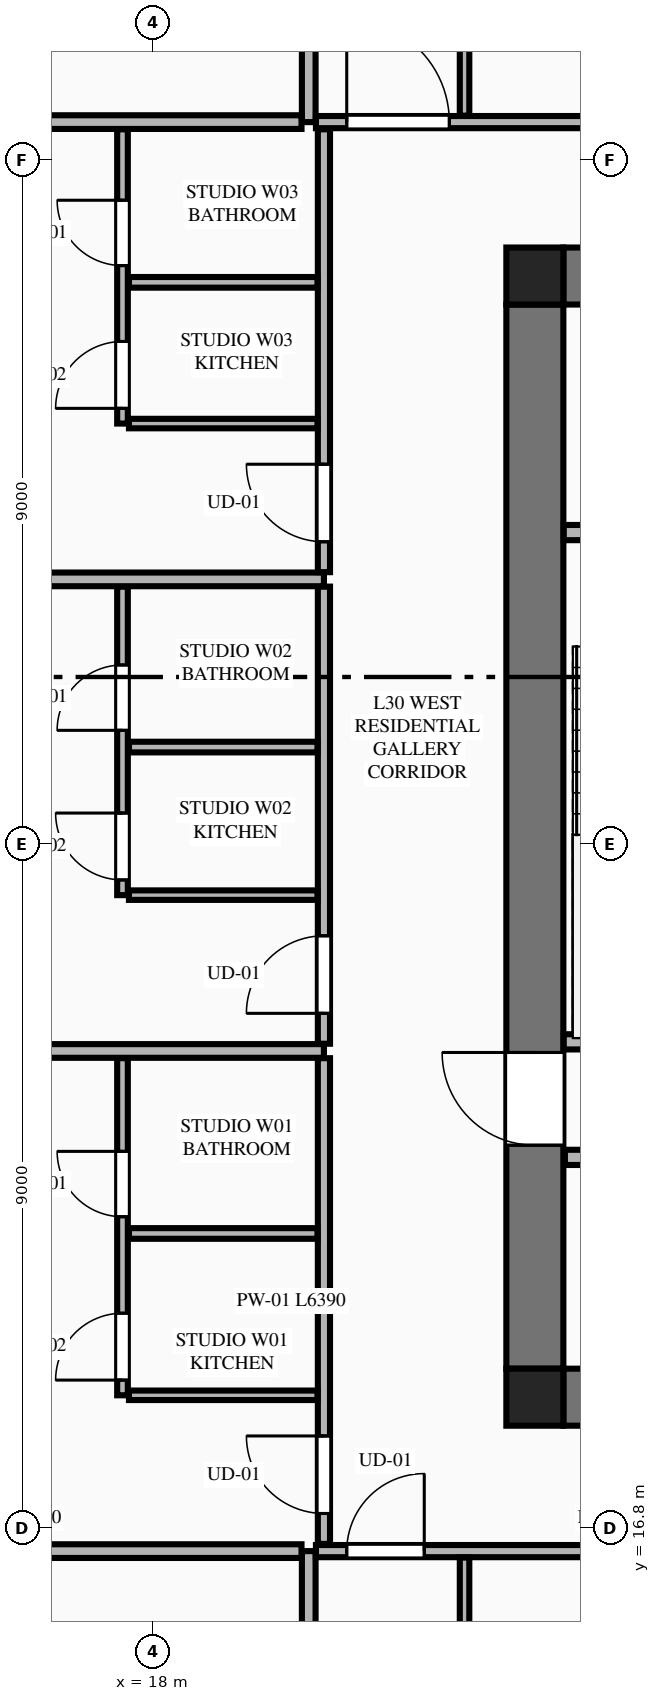
"""IFC4 building model, lengths in metres.
Left out: names, types, materials, properties, quantities, classifications, styles, units other than length and angle.
Written with IfcOpenShell. Run it as: python <this file> out.ifc"""

import sys

from ifc_helpers import new_model, si_unit, direction, frame, frame_2d, origin, origin_2d, place, context, subcontext, project, spatial, rectangle, extrude, element, fill, save


model = new_model("IFC4")
c1 = context("Model", 3, precision=1e-05, world=origin(), true_north=direction((0.0, 1.0)))
c2 = subcontext(c1, "Body", "Model", "MODEL_VIEW")
j1 = project(units=[si_unit("LENGTHUNIT", "METRE"), si_unit("PLANEANGLEUNIT", "RADIAN")], contexts=[c1])
p1 = place(None, origin())
s1 = spatial("IfcSite", under=j1, at=p1, CompositionType="ELEMENT")
p2 = place(p1, origin())
s2 = spatial("IfcBuilding", under=s1, at=p2, CompositionType="ELEMENT")
p3 = place(p2, frame((0.0, 0.0, 116.15)))
s3 = spatial("IfcBuildingStorey", under=s2, at=p3, CompositionType="ELEMENT", Elevation=116.15)
for number, where, z_axis, x_axis in (
    (1, (23.025, 18.525, 0.0), (0.0, 0.0, 1.0), (1.0, 0.0, 0.0)),
    (2, (23.025, 33.275, 0.0), (0.0, 0.0, 1.0), (1.0, 0.0, 0.0)),
):
    element("IfcColumn", number, at=place(p3, frame(where, z_axis=z_axis, x_axis=x_axis)), inside=s3, PredefinedType="COLUMN", context=c2, shape_type="SweptSolid", body=[
        extrude(rectangle(XDim=0.75, YDim=0.75, at=origin_2d()), origin(), (0.0, 0.0, 1.0), 3.55),
    ])
for number, where, z_axis, x_axis in (
    (3, (23.4, 18.525, 0.0), (0.0, 0.0, 1.0), (1.0, 0.0, 0.0)),
    (4, (23.4, 33.275, 0.0), (0.0, 0.0, 1.0), (1.0, 0.0, 0.0)),
):
    element("IfcWall", number, at=place(p3, frame(where, z_axis=z_axis, x_axis=x_axis)), inside=s3, PredefinedType="SHEAR", context=c2, shape_type="SweptSolid", body=[
        extrude(rectangle(XDim=18.0, YDim=0.75, at=frame_2d((9.0, 0.0))), origin(), (0.0, 0.0, 1.0), 3.34),
    ])
p4 = place(p3, frame((23.025, 18.9, 0.0), z_axis=(0.0, 0.0, 1.0), x_axis=(0.0, 1.0, 0.0)))
e5 = element("IfcWall", 5, at=p4, inside=s3, PredefinedType="SHEAR", context=c2, shape_type="SweptSolid", body=[
    extrude(rectangle(XDim=14.0, YDim=0.75, at=frame_2d((7.0, 0.0))), origin(), (0.0, 0.0, 1.0), 3.34),
])
p5 = place(p4, frame((2.94, 0.0, 0.0)))
e6 = element("IfcOpeningElement", 6, at=p5, cuts=e5, PredefinedType="OPENING", context=c2, shape_type="SweptSolid", body=[
    extrude(rectangle(XDim=1.22, YDim=2.25, at=frame_2d((0.61, 1.125))), frame((0.0, 0.385, 0.0), z_axis=(0.0, -1.0, 0.0), x_axis=(1.0, 0.0, 0.0)), (0.0, 0.0, 1.0), 0.77),
])
p6 = place(p3, frame((23.405, 23.2, 0.0), z_axis=(0.0, 0.0, 1.0), x_axis=(1.0, 0.0, 0.0)))
e7 = element("IfcWall", 7, at=p6, inside=s3, PredefinedType="PLUMBINGWALL", context=c2, shape_type="SweptSolid", body=[
    extrude(rectangle(XDim=3.27, YDim=0.2, at=frame_2d((1.635, 0.0))), origin(), (0.0, 0.0, 1.0), 3.34),
])
p7 = place(p3, frame((23.405, 29.9, 0.0), z_axis=(0.0, 0.0, 1.0), x_axis=(1.0, 0.0, 0.0)))
e8 = element("IfcWall", 8, at=p7, inside=s3, PredefinedType="PLUMBINGWALL", context=c2, shape_type="SweptSolid", body=[
    extrude(rectangle(XDim=3.27, YDim=0.2, at=frame_2d((1.635, 0.0))), origin(), (0.0, 0.0, 1.0), 3.34),
])
p8 = place(p7, frame((1.85, 0.0, 0.0)))
e9 = element("IfcOpeningElement", 9, at=p8, cuts=e8, PredefinedType="OPENING", context=c2, shape_type="SweptSolid", body=[
    extrude(rectangle(XDim=0.85, YDim=2.05, at=frame_2d((0.425, 1.025))), frame((0.0, 0.11, 0.0), z_axis=(0.0, -1.0, 0.0), x_axis=(1.0, 0.0, 0.0)), (0.0, 0.0, 1.0), 0.22),
])
p9 = place(p3, frame((23.42, 21.68, 0.0), z_axis=(0.0, 0.0, 1.0), x_axis=(1.0, 0.0, 0.0)))
e10 = element("IfcWall", 10, at=p9, inside=s3, PredefinedType="PLUMBINGWALL", context=c2, shape_type="SweptSolid", body=[
    extrude(rectangle(XDim=17.96, YDim=0.2, at=frame_2d((8.98, 0.0))), origin(), (0.0, 0.0, 1.0), 3.34),
])
p10 = place(p9, frame((11.6, 0.0, 0.0)))
e11 = element("IfcOpeningElement", 11, at=p10, cuts=e10, PredefinedType="OPENING", context=c2, shape_type="SweptSolid", body=[
    extrude(rectangle(XDim=1.1, YDim=2.2, at=frame_2d((0.55, 1.1))), frame((0.0, 0.11, 0.0), z_axis=(0.0, -1.0, 0.0), x_axis=(1.0, 0.0, 0.0)), (0.0, 0.0, 1.0), 0.22),
])
p11 = place(p9, frame((0.41, 0.0, 0.0)))
e12 = element("IfcOpeningElement", 12, at=p11, cuts=e10, PredefinedType="OPENING", context=c2, shape_type="SweptSolid", body=[
    extrude(rectangle(XDim=0.85, YDim=2.05, at=frame_2d((0.425, 1.025))), frame((0.0, 0.11, 0.0), z_axis=(0.0, -1.0, 0.0), x_axis=(1.0, 0.0, 0.0)), (0.0, 0.0, 1.0), 0.22),
])
p12 = place(p9, frame((6.03, 0.0, 0.0)))
e13 = element("IfcOpeningElement", 13, at=p12, cuts=e10, PredefinedType="OPENING", context=c2, shape_type="SweptSolid", body=[
    extrude(rectangle(XDim=0.85, YDim=2.05, at=frame_2d((0.425, 1.025))), frame((0.0, 0.11, 0.0), z_axis=(0.0, -1.0, 0.0), x_axis=(1.0, 0.0, 0.0)), (0.0, 0.0, 1.0), 0.22),
])
p13 = place(p9, frame((13.78, 0.0, 0.0)))
e14 = element("IfcOpeningElement", 14, at=p13, cuts=e10, PredefinedType="OPENING", context=c2, shape_type="SweptSolid", body=[
    extrude(rectangle(XDim=0.85, YDim=2.05, at=frame_2d((0.425, 1.025))), frame((0.0, 0.11, 0.0), z_axis=(0.0, -1.0, 0.0), x_axis=(1.0, 0.0, 0.0)), (0.0, 0.0, 1.0), 0.22),
])
p14 = place(p3, frame((20.05, 4.105, 0.0), z_axis=(0.0, 0.0, 1.0), x_axis=(0.0, 1.0, 0.0)))
e15 = element("IfcWall", 15, at=p14, inside=s3, PredefinedType="PARTITIONING", context=c2, shape_type="SweptSolid", body=[
    extrude(rectangle(XDim=12.395, YDim=0.18, at=frame_2d((6.198, 0.0))), origin(), (0.0, 0.0, 1.0), 3.34),
])
p15 = place(p3, frame((20.145, 16.5, 0.0), z_axis=(0.0, 0.0, 1.0), x_axis=(1.0, 0.0, 0.0)))
e16 = element("IfcWall", 16, at=p15, inside=s3, PredefinedType="PARTITIONING", context=c2, shape_type="SweptSolid", body=[
    extrude(rectangle(XDim=8.328, YDim=0.16, at=frame_2d((4.164, 0.0))), origin(), (0.0, 0.0, 1.0), 3.34),
])
p16 = place(p15, frame((0.405, 0.0, 0.0)))
e17 = element("IfcOpeningElement", 17, at=p16, cuts=e16, PredefinedType="OPENING", context=c2, shape_type="SweptSolid", body=[
    extrude(rectangle(XDim=1.02, YDim=2.25, at=frame_2d((0.51, 1.125))), frame((0.0, 0.09, 0.0), z_axis=(0.0, -1.0, 0.0), x_axis=(1.0, 0.0, 0.0)), (0.0, 0.0, 1.0), 0.18),
])
p17 = place(p3, frame((22.1, 12.391, 0.0), z_axis=(0.0, 0.0, 1.0), x_axis=(0.0, 1.0, 0.0)))
e18 = element("IfcWall", 18, at=p17, inside=s3, PredefinedType="PARTITIONING", context=c2, shape_type="SweptSolid", body=[
    extrude(rectangle(XDim=4.024, YDim=0.125, at=frame_2d((2.012, 0.0))), origin(), (0.0, 0.0, 1.0), 2.722),
])
p18 = place(p3, frame((20.05, 35.3, 0.0), z_axis=(0.0, 0.0, 1.0), x_axis=(0.0, 1.0, 0.0)))
e19 = element("IfcWall", 19, at=p18, inside=s3, PredefinedType="PARTITIONING", context=c2, shape_type="SweptSolid", body=[
    extrude(rectangle(XDim=12.195, YDim=0.18, at=frame_2d((6.098, 0.0))), origin(), (0.0, 0.0, 1.0), 3.34),
])
p19 = place(p3, frame((20.145, 35.3, 0.0), z_axis=(0.0, 0.0, 1.0), x_axis=(1.0, 0.0, 0.0)))
e20 = element("IfcWall", 20, at=p19, inside=s3, PredefinedType="PARTITIONING", context=c2, shape_type="SweptSolid", body=[
    extrude(rectangle(XDim=24.51, YDim=0.16, at=frame_2d((12.255, 0.0))), origin(), (0.0, 0.0, 1.0), 3.34),
])
p20 = place(p19, frame((0.405, 0.0, 0.0)))
e21 = element("IfcOpeningElement", 21, at=p20, cuts=e20, PredefinedType="OPENING", context=c2, shape_type="SweptSolid", body=[
    extrude(rectangle(XDim=1.35, YDim=2.35, at=frame_2d((0.675, 1.175))), frame((0.0, 0.09, 0.0), z_axis=(0.0, -1.0, 0.0), x_axis=(1.0, 0.0, 0.0)), (0.0, 0.0, 1.0), 0.18),
])
p21 = place(p3, frame((22.1, 35.385, 0.0), z_axis=(0.0, 0.0, 1.0), x_axis=(0.0, 1.0, 0.0)))
e22 = element("IfcWall", 22, at=p21, inside=s3, PredefinedType="PARTITIONING", context=c2, shape_type="SweptSolid", body=[
    extrude(rectangle(XDim=6.395, YDim=0.125, at=frame_2d((3.198, 0.0))), origin(), (0.0, 0.0, 1.0), 2.722),
])
p22 = place(p3, frame((12.185, 16.5, 0.0), z_axis=(0.0, 0.0, 1.0), x_axis=(1.0, 0.0, 0.0)))
e23 = element("IfcWall", 23, at=p22, inside=s3, PredefinedType="PARTITIONING", context=c2, shape_type="SweptSolid", body=[
    extrude(rectangle(XDim=7.77, YDim=0.18, at=frame_2d((3.885, 0.0))), origin(), (0.0, 0.0, 1.0), 3.34),
])
p23 = place(p3, frame((12.286, 35.3, 0.0), z_axis=(0.0, 0.0, 1.0), x_axis=(1.0, 0.0, 0.0)))
e24 = element("IfcWall", 24, at=p23, inside=s3, PredefinedType="PARTITIONING", context=c2, shape_type="SweptSolid", body=[
    extrude(rectangle(XDim=7.669, YDim=0.18, at=frame_2d((3.834, 0.0))), origin(), (0.0, 0.0, 1.0), 3.34),
])
p24 = place(p3, frame((20.25, 16.595, 0.0), z_axis=(0.0, 0.0, 1.0), x_axis=(0.0, 1.0, 0.0)))
e25 = element("IfcWall", 25, at=p24, inside=s3, PredefinedType="PARTITIONING", context=c2, shape_type="SweptSolid", body=[
    extrude(rectangle(XDim=6.39, YDim=0.16, at=frame_2d((3.195, 0.0))), origin(), (0.0, 0.0, 1.0), 3.34),
])
p25 = place(p24, frame((0.4, 0.0, 0.0)))
e26 = element("IfcOpeningElement", 26, at=p25, cuts=e25, PredefinedType="OPENING", context=c2, shape_type="SweptSolid", body=[
    extrude(rectangle(XDim=1.02, YDim=2.25, at=frame_2d((0.51, 1.125))), frame((0.0, 0.09, 0.0), z_axis=(0.0, -1.0, 0.0), x_axis=(1.0, 0.0, 0.0)), (0.0, 0.0, 1.0), 0.18),
])
p26 = place(p3, frame((17.685, 18.55, 0.0), z_axis=(0.0, 0.0, 1.0), x_axis=(1.0, 0.0, 0.0)))
e27 = element("IfcWall", 27, at=p26, inside=s3, PredefinedType="PARTITIONING", context=c2, shape_type="SweptSolid", body=[
    extrude(rectangle(XDim=2.48, YDim=0.125, at=frame_2d((1.24, 0.0))), origin(), (0.0, 0.0, 1.0), 2.722),
])
p27 = place(p3, frame((17.6, 18.55, 0.0), z_axis=(0.0, 0.0, 1.0), x_axis=(0.0, 1.0, 0.0)))
e28 = element("IfcWall", 28, at=p27, inside=s3, PredefinedType="PLUMBINGWALL", context=c2, shape_type="SweptSolid", body=[
    extrude(rectangle(XDim=4.435, YDim=0.14, at=frame_2d((2.218, 0.0))), origin(), (0.0, 0.0, 1.0), 3.34),
])
p28 = place(p27, frame((2.349, 0.0, 0.0)))
e29 = element("IfcOpeningElement", 29, at=p28, cuts=e28, PredefinedType="OPENING", context=c2, shape_type="SweptSolid", body=[
    extrude(rectangle(XDim=0.86, YDim=2.1, at=frame_2d((0.43, 1.05))), frame((0.0, 0.08, 0.0), z_axis=(0.0, -1.0, 0.0), x_axis=(1.0, 0.0, 0.0)), (0.0, 0.0, 1.0), 0.16),
])
p29 = place(p27, frame((0.2, 0.0, 0.0)))
e30 = element("IfcOpeningElement", 30, at=p29, cuts=e28, PredefinedType="OPENING", context=c2, shape_type="SweptSolid", body=[
    extrude(rectangle(XDim=0.88, YDim=2.15, at=frame_2d((0.44, 1.075))), frame((0.0, 0.08, 0.0), z_axis=(0.0, -1.0, 0.0), x_axis=(1.0, 0.0, 0.0)), (0.0, 0.0, 1.0), 0.16),
])
p30 = place(p3, frame((17.685, 20.679, 0.0), z_axis=(0.0, 0.0, 1.0), x_axis=(1.0, 0.0, 0.0)))
e31 = element("IfcWall", 31, at=p30, inside=s3, PredefinedType="PLUMBINGWALL", context=c2, shape_type="SweptSolid", body=[
    extrude(rectangle(XDim=2.48, YDim=0.14, at=frame_2d((1.24, 0.0))), origin(), (0.0, 0.0, 1.0), 3.34),
])
p31 = place(p3, frame((8.856, 23.08, 0.0), z_axis=(0.0, 0.0, 1.0), x_axis=(1.0, 0.0, 0.0)))
e32 = element("IfcWall", 32, at=p31, inside=s3, PredefinedType="PARTITIONING", context=c2, shape_type="SweptSolid", body=[
    extrude(rectangle(XDim=11.394, YDim=0.18, at=frame_2d((5.697, 0.0))), origin(), (0.0, 0.0, 1.0), 3.34),
])
p32 = place(p3, frame((20.25, 23.175, 0.0), z_axis=(0.0, 0.0, 1.0), x_axis=(0.0, 1.0, 0.0)))
e33 = element("IfcWall", 33, at=p32, inside=s3, PredefinedType="PARTITIONING", context=c2, shape_type="SweptSolid", body=[
    extrude(rectangle(XDim=6.014, YDim=0.16, at=frame_2d((3.007, 0.0))), origin(), (0.0, 0.0, 1.0), 3.34),
])
p33 = place(p32, frame((0.4, 0.0, 0.0)))
e34 = element("IfcOpeningElement", 34, at=p33, cuts=e33, PredefinedType="OPENING", context=c2, shape_type="SweptSolid", body=[
    extrude(rectangle(XDim=1.02, YDim=2.25, at=frame_2d((0.51, 1.125))), frame((0.0, 0.09, 0.0), z_axis=(0.0, -1.0, 0.0), x_axis=(1.0, 0.0, 0.0)), (0.0, 0.0, 1.0), 0.18),
])
p34 = place(p3, frame((17.685, 25.13, 0.0), z_axis=(0.0, 0.0, 1.0), x_axis=(1.0, 0.0, 0.0)))
e35 = element("IfcWall", 35, at=p34, inside=s3, PredefinedType="PARTITIONING", context=c2, shape_type="SweptSolid", body=[
    extrude(rectangle(XDim=2.48, YDim=0.125, at=frame_2d((1.24, 0.0))), origin(), (0.0, 0.0, 1.0), 3.34),
])
p35 = place(p3, frame((17.6, 25.13, 0.0), z_axis=(0.0, 0.0, 1.0), x_axis=(0.0, 1.0, 0.0)))
e36 = element("IfcWall", 36, at=p35, inside=s3, PredefinedType="PLUMBINGWALL", context=c2, shape_type="SweptSolid", body=[
    extrude(rectangle(XDim=4.059, YDim=0.14, at=frame_2d((2.03, 0.0))), origin(), (0.0, 0.0, 1.0), 3.34),
])
p36 = place(p35, frame((2.168, 0.0, 0.0)))
e37 = element("IfcOpeningElement", 37, at=p36, cuts=e36, PredefinedType="OPENING", context=c2, shape_type="SweptSolid", body=[
    extrude(rectangle(XDim=0.86, YDim=2.1, at=frame_2d((0.43, 1.05))), frame((0.0, 0.08, 0.0), z_axis=(0.0, -1.0, 0.0), x_axis=(1.0, 0.0, 0.0)), (0.0, 0.0, 1.0), 0.16),
])
p37 = place(p35, frame((0.2, 0.0, 0.0)))
e38 = element("IfcOpeningElement", 38, at=p37, cuts=e36, PredefinedType="OPENING", context=c2, shape_type="SweptSolid", body=[
    extrude(rectangle(XDim=0.88, YDim=2.15, at=frame_2d((0.44, 1.075))), frame((0.0, 0.08, 0.0), z_axis=(0.0, -1.0, 0.0), x_axis=(1.0, 0.0, 0.0)), (0.0, 0.0, 1.0), 0.16),
])
p38 = place(p3, frame((17.685, 27.078, 0.0), z_axis=(0.0, 0.0, 1.0), x_axis=(1.0, 0.0, 0.0)))
e39 = element("IfcWall", 39, at=p38, inside=s3, PredefinedType="PLUMBINGWALL", context=c2, shape_type="SweptSolid", body=[
    extrude(rectangle(XDim=2.48, YDim=0.14, at=frame_2d((1.24, 0.0))), origin(), (0.0, 0.0, 1.0), 3.34),
])
p39 = place(p3, frame((9.242, 29.284, 0.0), z_axis=(0.0, 0.0, 1.0), x_axis=(1.0, 0.0, 0.0)))
e40 = element("IfcWall", 40, at=p39, inside=s3, PredefinedType="PARTITIONING", context=c2, shape_type="SweptSolid", body=[
    extrude(rectangle(XDim=11.008, YDim=0.18, at=frame_2d((5.504, 0.0))), origin(), (0.0, 0.0, 1.0), 3.34),
])
p40 = place(p3, frame((20.25, 29.379, 0.0), z_axis=(0.0, 0.0, 1.0), x_axis=(0.0, 1.0, 0.0)))
e41 = element("IfcWall", 41, at=p40, inside=s3, PredefinedType="PARTITIONING", context=c2, shape_type="SweptSolid", body=[
    extrude(rectangle(XDim=5.826, YDim=0.16, at=frame_2d((2.913, 0.0))), origin(), (0.0, 0.0, 1.0), 3.34),
])
p41 = place(p40, frame((0.4, 0.0, 0.0)))
e42 = element("IfcOpeningElement", 42, at=p41, cuts=e41, PredefinedType="OPENING", context=c2, shape_type="SweptSolid", body=[
    extrude(rectangle(XDim=1.02, YDim=2.25, at=frame_2d((0.51, 1.125))), frame((0.0, 0.09, 0.0), z_axis=(0.0, -1.0, 0.0), x_axis=(1.0, 0.0, 0.0)), (0.0, 0.0, 1.0), 0.18),
])
p42 = place(p3, frame((17.685, 31.334, 0.0), z_axis=(0.0, 0.0, 1.0), x_axis=(1.0, 0.0, 0.0)))
e43 = element("IfcWall", 43, at=p42, inside=s3, PredefinedType="PARTITIONING", context=c2, shape_type="SweptSolid", body=[
    extrude(rectangle(XDim=2.48, YDim=0.125, at=frame_2d((1.24, 0.0))), origin(), (0.0, 0.0, 1.0), 3.34),
])
p43 = place(p3, frame((17.6, 31.334, 0.0), z_axis=(0.0, 0.0, 1.0), x_axis=(0.0, 1.0, 0.0)))
e44 = element("IfcWall", 44, at=p43, inside=s3, PredefinedType="PLUMBINGWALL", context=c2, shape_type="SweptSolid", body=[
    extrude(rectangle(XDim=3.871, YDim=0.14, at=frame_2d((1.936, 0.0))), origin(), (0.0, 0.0, 1.0), 3.34),
])
p44 = place(p43, frame((2.078, 0.0, 0.0)))
e45 = element("IfcOpeningElement", 45, at=p44, cuts=e44, PredefinedType="OPENING", context=c2, shape_type="SweptSolid", body=[
    extrude(rectangle(XDim=0.86, YDim=2.1, at=frame_2d((0.43, 1.05))), frame((0.0, 0.08, 0.0), z_axis=(0.0, -1.0, 0.0), x_axis=(1.0, 0.0, 0.0)), (0.0, 0.0, 1.0), 0.16),
])
p45 = place(p43, frame((0.2, 0.0, 0.0)))
e46 = element("IfcOpeningElement", 46, at=p45, cuts=e44, PredefinedType="OPENING", context=c2, shape_type="SweptSolid", body=[
    extrude(rectangle(XDim=0.88, YDim=2.15, at=frame_2d((0.44, 1.075))), frame((0.0, 0.08, 0.0), z_axis=(0.0, -1.0, 0.0), x_axis=(1.0, 0.0, 0.0)), (0.0, 0.0, 1.0), 0.16),
])
p46 = place(p3, frame((17.685, 33.192, 0.0), z_axis=(0.0, 0.0, 1.0), x_axis=(1.0, 0.0, 0.0)))
e47 = element("IfcWall", 47, at=p46, inside=s3, PredefinedType="PLUMBINGWALL", context=c2, shape_type="SweptSolid", body=[
    extrude(rectangle(XDim=2.48, YDim=0.14, at=frame_2d((1.24, 0.0))), origin(), (0.0, 0.0, 1.0), 2.722),
])
p47 = place(p5, origin())
e48 = element("IfcDoor", 48, at=p47, inside=s3, OperationType="SINGLE_SWING_RIGHT", PredefinedType="DOOR", context=c2, shape_type="SweptSolid", body=[
    extrude(rectangle(XDim=1.22, YDim=2.25, at=frame_2d((0.61, 1.125))), frame((0.0, 0.025, 0.0), z_axis=(0.0, -1.0, 0.0), x_axis=(1.0, 0.0, 0.0)), (0.0, 0.0, 1.0), 0.05),
])
fill(e6, e48)
p48 = place(p16, origin())
e49 = element("IfcDoor", 49, at=p48, inside=s3, OperationType="SINGLE_SWING_RIGHT", PredefinedType="DOOR", context=c2, shape_type="SweptSolid", body=[
    extrude(rectangle(XDim=1.02, YDim=2.25, at=frame_2d((0.51, 1.125))), frame((0.0, 0.025, 0.0), z_axis=(0.0, -1.0, 0.0), x_axis=(1.0, 0.0, 0.0)), (0.0, 0.0, 1.0), 0.05),
])
fill(e17, e49)
p49 = place(p20, origin())
e50 = element("IfcDoor", 50, at=p49, inside=s3, OperationType="SINGLE_SWING_LEFT", PredefinedType="DOOR", context=c2, shape_type="SweptSolid", body=[
    extrude(rectangle(XDim=1.35, YDim=2.35, at=frame_2d((0.675, 1.175))), frame((0.0, 0.025, 0.0), z_axis=(0.0, -1.0, 0.0), x_axis=(1.0, 0.0, 0.0)), (0.0, 0.0, 1.0), 0.05),
])
fill(e21, e50)
p50 = place(p28, origin())
e51 = element("IfcDoor", 51, at=p50, inside=s3, OperationType="SINGLE_SWING_RIGHT", PredefinedType="DOOR", context=c2, shape_type="SweptSolid", body=[
    extrude(rectangle(XDim=0.86, YDim=2.1, at=frame_2d((0.43, 1.05))), frame((0.0, 0.025, 0.0), z_axis=(0.0, -1.0, 0.0), x_axis=(1.0, 0.0, 0.0)), (0.0, 0.0, 1.0), 0.05),
])
fill(e29, e51)
p51 = place(p25, origin())
e52 = element("IfcDoor", 52, at=p51, inside=s3, OperationType="SINGLE_SWING_RIGHT", PredefinedType="DOOR", context=c2, shape_type="SweptSolid", body=[
    extrude(rectangle(XDim=1.02, YDim=2.25, at=frame_2d((0.51, 1.125))), frame((0.0, 0.025, 0.0), z_axis=(0.0, -1.0, 0.0), x_axis=(1.0, 0.0, 0.0)), (0.0, 0.0, 1.0), 0.05),
])
fill(e26, e52)
p52 = place(p29, origin())
e53 = element("IfcDoor", 53, at=p52, inside=s3, OperationType="SINGLE_SWING_LEFT", PredefinedType="DOOR", context=c2, shape_type="SweptSolid", body=[
    extrude(rectangle(XDim=0.88, YDim=2.15, at=frame_2d((0.44, 1.075))), frame((0.0, 0.025, 0.0), z_axis=(0.0, -1.0, 0.0), x_axis=(1.0, 0.0, 0.0)), (0.0, 0.0, 1.0), 0.05),
])
fill(e30, e53)
p53 = place(p36, origin())
e54 = element("IfcDoor", 54, at=p53, inside=s3, OperationType="SINGLE_SWING_LEFT", PredefinedType="DOOR", context=c2, shape_type="SweptSolid", body=[
    extrude(rectangle(XDim=0.86, YDim=2.1, at=frame_2d((0.43, 1.05))), frame((0.0, 0.025, 0.0), z_axis=(0.0, -1.0, 0.0), x_axis=(1.0, 0.0, 0.0)), (0.0, 0.0, 1.0), 0.05),
])
fill(e37, e54)
p54 = place(p33, origin())
e55 = element("IfcDoor", 55, at=p54, inside=s3, OperationType="SINGLE_SWING_LEFT", PredefinedType="DOOR", context=c2, shape_type="SweptSolid", body=[
    extrude(rectangle(XDim=1.02, YDim=2.25, at=frame_2d((0.51, 1.125))), frame((0.0, 0.025, 0.0), z_axis=(0.0, -1.0, 0.0), x_axis=(1.0, 0.0, 0.0)), (0.0, 0.0, 1.0), 0.05),
])
fill(e34, e55)
p55 = place(p37, origin())
e56 = element("IfcDoor", 56, at=p55, inside=s3, OperationType="SINGLE_SWING_RIGHT", PredefinedType="DOOR", context=c2, shape_type="SweptSolid", body=[
    extrude(rectangle(XDim=0.88, YDim=2.15, at=frame_2d((0.44, 1.075))), frame((0.0, 0.025, 0.0), z_axis=(0.0, -1.0, 0.0), x_axis=(1.0, 0.0, 0.0)), (0.0, 0.0, 1.0), 0.05),
])
fill(e38, e56)
p56 = place(p44, origin())
e57 = element("IfcDoor", 57, at=p56, inside=s3, OperationType="SINGLE_SWING_RIGHT", PredefinedType="DOOR", context=c2, shape_type="SweptSolid", body=[
    extrude(rectangle(XDim=0.86, YDim=2.1, at=frame_2d((0.43, 1.05))), frame((0.0, 0.025, 0.0), z_axis=(0.0, -1.0, 0.0), x_axis=(1.0, 0.0, 0.0)), (0.0, 0.0, 1.0), 0.05),
])
fill(e45, e57)
p57 = place(p41, origin())
e58 = element("IfcDoor", 58, at=p57, inside=s3, OperationType="SINGLE_SWING_RIGHT", PredefinedType="DOOR", context=c2, shape_type="SweptSolid", body=[
    extrude(rectangle(XDim=1.02, YDim=2.25, at=frame_2d((0.51, 1.125))), frame((0.0, 0.025, 0.0), z_axis=(0.0, -1.0, 0.0), x_axis=(1.0, 0.0, 0.0)), (0.0, 0.0, 1.0), 0.05),
])
fill(e42, e58)
p58 = place(p45, origin())
e59 = element("IfcDoor", 59, at=p58, inside=s3, OperationType="SINGLE_SWING_LEFT", PredefinedType="DOOR", context=c2, shape_type="SweptSolid", body=[
    extrude(rectangle(XDim=0.88, YDim=2.15, at=frame_2d((0.44, 1.075))), frame((0.0, 0.025, 0.0), z_axis=(0.0, -1.0, 0.0), x_axis=(1.0, 0.0, 0.0)), (0.0, 0.0, 1.0), 0.05),
])
fill(e46, e59)
save(model, sys.argv[1])
